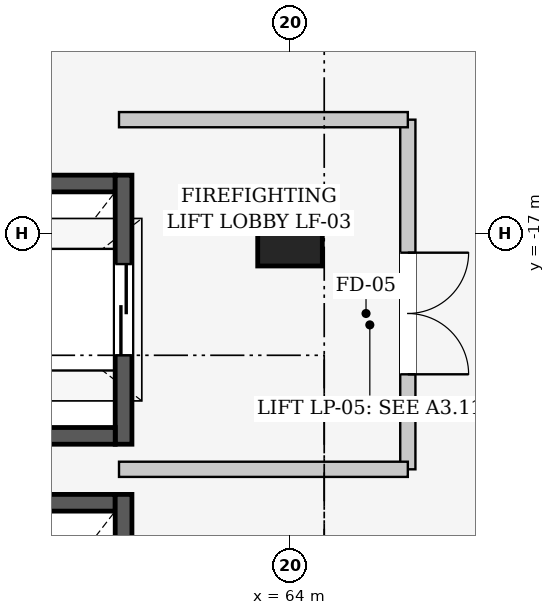
"""IFC4 building model, lengths in metres.
Left out: names, types, materials, properties, quantities, classifications, styles, units other than length and angle.
Written with IfcOpenShell. Run it as: python <this file> out.ifc"""

import sys

from ifc_helpers import new_model, si_unit, direction, frame, frame_2d, origin, origin_2d, place, context, subcontext, project, spatial, rectangle, extrude, element, fill, save


model = new_model("IFC4")
c1 = context("Model", 3, precision=1e-05, world=origin(), true_north=direction((0.0, 1.0)))
c2 = subcontext(c1, "Body", "Model", "MODEL_VIEW")
j1 = project(units=[si_unit("LENGTHUNIT", "METRE"), si_unit("PLANEANGLEUNIT", "RADIAN")], contexts=[c1])
p1 = place(None, origin())
s1 = spatial("IfcSite", under=j1, at=p1, CompositionType="ELEMENT")
p2 = place(p1, origin())
s2 = spatial("IfcBuilding", under=s1, at=p2, CompositionType="ELEMENT")
p3 = place(p2, frame((0.0, 0.0, 11.4)))
s3 = spatial("IfcBuildingStorey", under=s2, at=p3, CompositionType="ELEMENT", Elevation=11.4)
p4 = place(p3, frame((64.0, -17.0, 0.0), z_axis=(0.0, 0.0, 1.0), x_axis=(1.0, 0.0, 0.0)))
e1 = element("IfcColumn", 1, at=p4, inside=s3, PredefinedType="COLUMN", context=c2, shape_type="SweptSolid", body=[
    extrude(rectangle(XDim=0.85, YDim=0.85, at=origin_2d()), origin(), (0.0, 0.0, 1.0), 4.8),
])
p5 = place(p3, frame((59.3, -16.34, 0.0), z_axis=(0.0, 0.0, 1.0), x_axis=(1.0, 0.0, 0.0)))
e2 = element("IfcWall", 2, at=p5, inside=s3, PredefinedType="SHEAR", context=c2, shape_type="SweptSolid", body=[
    extrude(rectangle(XDim=2.4, YDim=0.22, at=frame_2d((1.2, 0.0))), origin(), (0.0, 0.0, 1.0), 4.8),
])
p6 = place(p3, frame((61.81, -16.23, 0.0), z_axis=(0.0, 0.0, 1.0), x_axis=(0.0, -1.0, 0.0)))
e3 = element("IfcWall", 3, at=p6, inside=s3, PredefinedType="SHEAR", context=c2, shape_type="SweptSolid", body=[
    extrude(rectangle(XDim=3.54, YDim=0.22, at=frame_2d((1.77, 0.0))), origin(), (0.0, 0.0, 1.0), 4.8),
])
p7 = place(p6, frame((1.17, 0.0, 0.0)))
e4 = element("IfcOpeningElement", 4, at=p7, cuts=e3, PredefinedType="OPENING", context=c2, shape_type="SweptSolid", body=[
    extrude(rectangle(XDim=1.2, YDim=2.2, at=frame_2d((0.6, 1.1))), frame((0.0, 0.12, 0.0), z_axis=(0.0, -1.0, 0.0), x_axis=(1.0, 0.0, 0.0)), (0.0, 0.0, 1.0), 0.24),
])
for number, where, z_axis, x_axis in (
    (5, (61.7, -19.66, 0.0), (0.0, 0.0, 1.0), (-1.0, 0.0, 0.0)),
    (6, (59.3, -20.54, 0.0), (0.0, 0.0, 1.0), (1.0, 0.0, 0.0)),
):
    element("IfcWall", number, at=place(p3, frame(where, z_axis=z_axis, x_axis=x_axis)), inside=s3, PredefinedType="SHEAR", context=c2, shape_type="SweptSolid", body=[
        extrude(rectangle(XDim=2.4, YDim=0.22, at=frame_2d((1.2, 0.0))), origin(), (0.0, 0.0, 1.0), 4.8),
    ])
p8 = place(p3, frame((61.81, -20.43, 0.0), z_axis=(0.0, 0.0, 1.0), x_axis=(0.0, -1.0, 0.0)))
e7 = element("IfcWall", 7, at=p8, inside=s3, PredefinedType="SHEAR", context=c2, shape_type="SweptSolid", body=[
    extrude(rectangle(XDim=3.54, YDim=0.22, at=frame_2d((1.77, 0.0))), origin(), (0.0, 0.0, 1.0), 4.8),
])
p9 = place(p8, frame((1.22, 0.0, 0.0)))
e8 = element("IfcOpeningElement", 8, at=p9, cuts=e7, PredefinedType="OPENING", context=c2, shape_type="SweptSolid", body=[
    extrude(rectangle(XDim=1.1, YDim=2.2, at=frame_2d((0.55, 1.1))), frame((0.0, 0.12, 0.0), z_axis=(0.0, -1.0, 0.0), x_axis=(1.0, 0.0, 0.0)), (0.0, 0.0, 1.0), 0.24),
])
p10 = place(p3, frame((65.55, -15.5, 0.0), z_axis=(0.0, 0.0, 1.0), x_axis=(0.0, -1.0, 0.0)))
e9 = element("IfcWall", 9, at=p10, inside=s3, PredefinedType="PARTITIONING", context=c2, shape_type="SweptSolid", body=[
    extrude(rectangle(XDim=4.6, YDim=0.2, at=frame_2d((2.3, 0.0))), origin(), (0.0, 0.0, 1.0), 3.545),
])
p11 = place(p10, frame((1.75, 0.0, 0.0)))
e10 = element("IfcOpeningElement", 10, at=p11, cuts=e9, PredefinedType="OPENING", context=c2, shape_type="SweptSolid", body=[
    extrude(rectangle(XDim=1.6, YDim=2.2, at=frame_2d((0.8, 1.1))), frame((0.0, 0.11, 0.0), z_axis=(0.0, -1.0, 0.0), x_axis=(1.0, 0.0, 0.0)), (0.0, 0.0, 1.0), 0.22),
])
for number, where, z_axis, x_axis in (
    (11, (61.75, -15.5, 0.0), (0.0, 0.0, 1.0), (1.0, 0.0, 0.0)),
    (12, (65.55, -20.1, 0.0), (0.0, 0.0, 1.0), (-1.0, 0.0, 0.0)),
):
    element("IfcWall", number, at=place(p3, frame(where, z_axis=z_axis, x_axis=x_axis)), inside=s3, PredefinedType="PARTITIONING", context=c2, shape_type="SweptSolid", body=[
        extrude(rectangle(XDim=3.8, YDim=0.2, at=frame_2d((1.9, 0.0))), origin(), (0.0, 0.0, 1.0), 3.845),
    ])
p12 = place(p7, origin())
e13 = element("IfcDoor", 13, at=p12, inside=s3, OperationType="SLIDING_TO_LEFT", PredefinedType="DOOR", context=c2, shape_type="SweptSolid", body=[
    extrude(rectangle(XDim=1.2, YDim=2.2, at=frame_2d((0.6, 1.1))), frame((0.0, 0.025, 0.0), z_axis=(0.0, -1.0, 0.0), x_axis=(1.0, 0.0, 0.0)), (0.0, 0.0, 1.0), 0.05),
])
fill(e4, e13)
p13 = place(p11, origin())
e14 = element("IfcDoor", 14, at=p13, inside=s3, OperationType="DOUBLE_DOOR_SINGLE_SWING", PredefinedType="DOOR", context=c2, shape_type="SweptSolid", body=[
    extrude(rectangle(XDim=1.6, YDim=2.2, at=frame_2d((0.8, 1.1))), frame((0.0, 0.025, 0.0), z_axis=(0.0, -1.0, 0.0), x_axis=(1.0, 0.0, 0.0)), (0.0, 0.0, 1.0), 0.05),
])
fill(e10, e14)
save(model, sys.argv[1])
